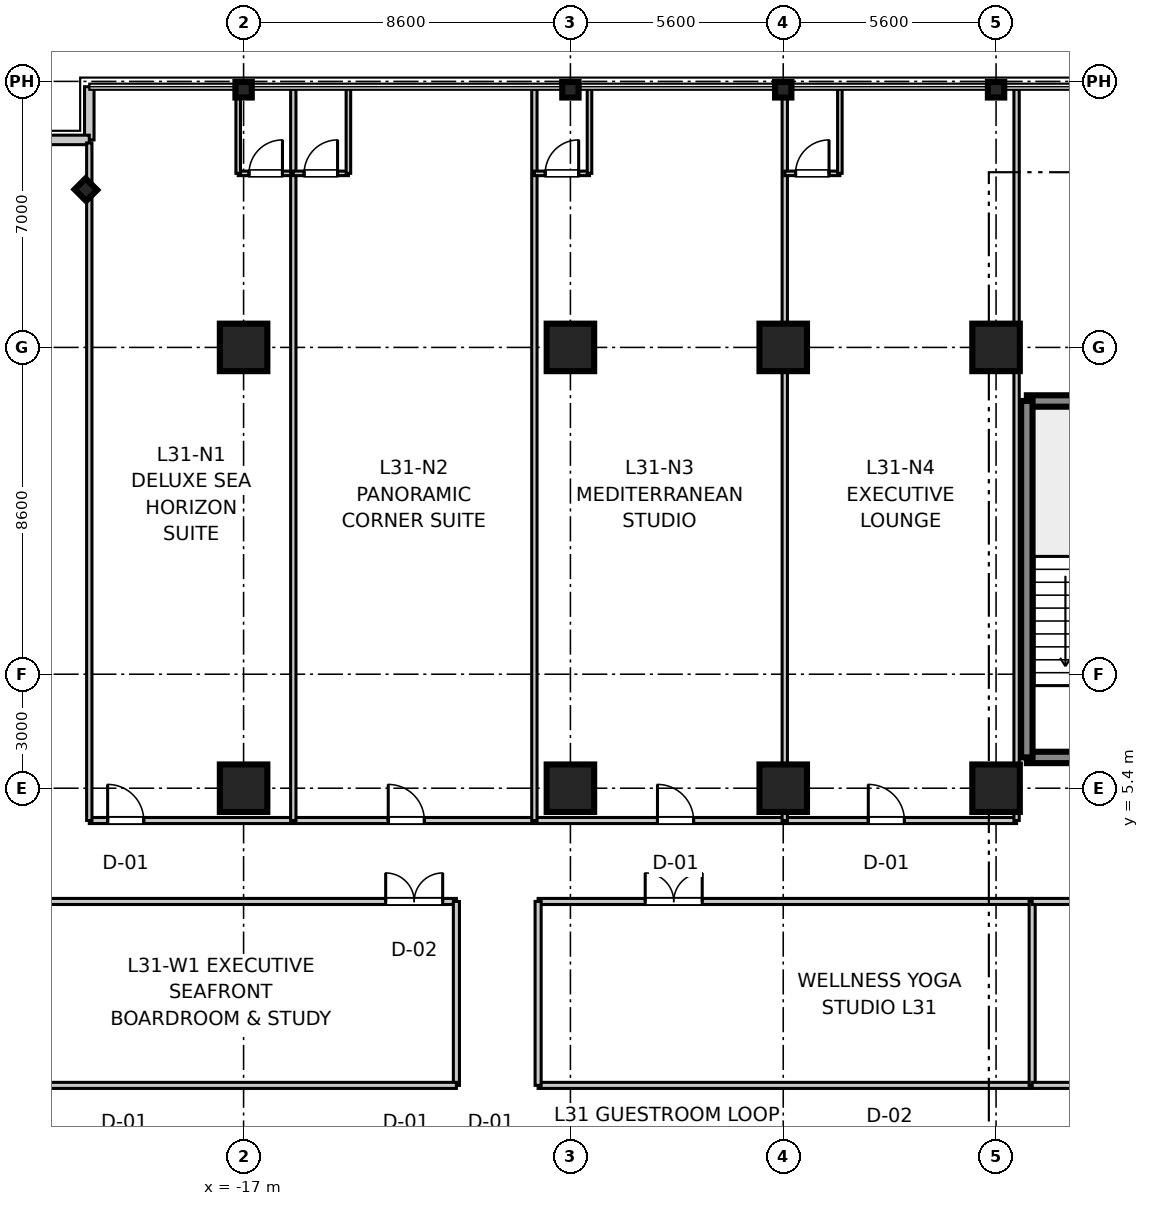
"""IFC4 building model, lengths in metres.
Left out: names, types, materials, properties, quantities, classifications, styles, units other than length and angle.
Written with IfcOpenShell. Run it as: python <this file> out.ifc"""

import sys

from ifc_helpers import new_model, si_unit, direction, frame, frame_2d, origin, origin_2d, place, context, subcontext, project, spatial, rectangle, i_section, extrude, source, transform, mapped, element, fill, save


model = new_model("IFC4")
c1 = context("Model", 3, precision=1e-05, world=origin(), true_north=direction((0.0, 1.0)))
c2 = subcontext(c1, "Body", "Model", "MODEL_VIEW")
j1 = project(units=[si_unit("LENGTHUNIT", "METRE"), si_unit("PLANEANGLEUNIT", "RADIAN")], contexts=[c1])
p1 = place(None, origin())
s1 = spatial("IfcSite", under=j1, at=p1, CompositionType="ELEMENT")
p2 = place(p1, origin())
s2 = spatial("IfcBuilding", under=s1, at=p2, CompositionType="ELEMENT")
p3 = place(p2, frame((0.0, 0.0, 124.8)))
s3 = spatial("IfcBuildingStorey", under=s2, at=p3, CompositionType="ELEMENT", Elevation=124.8)
m1 = source(origin(), c2, "Body", "SweptSolid", [
    extrude(rectangle(XDim=1.25, YDim=1.25, at=origin_2d()), origin(), (0.0, 0.0, 1.0), 3.605),
])
for number, where, z_axis, x_axis in (
    (1, (-17.0, 5.4, 0.0), (0.0, 0.0, 1.0), (1.0, 0.0, 0.0)),
    (2, (-17.0, 17.0, 0.0), (0.0, 0.0, 1.0), (1.0, 0.0, 0.0)),
    (3, (-8.4, 5.4, 0.0), (0.0, 0.0, 1.0), (1.0, 0.0, 0.0)),
    (4, (-8.4, 17.0, 0.0), (0.0, 0.0, 1.0), (1.0, 0.0, 0.0)),
    (5, (-2.8, 5.4, 0.0), (0.0, 0.0, 1.0), (1.0, 0.0, 0.0)),
    (6, (-2.8, 17.0, 0.0), (0.0, 0.0, 1.0), (1.0, 0.0, 0.0)),
    (7, (2.8, 5.4, 0.0), (0.0, 0.0, 1.0), (1.0, 0.0, 0.0)),
    (8, (2.8, 17.0, 0.0), (0.0, 0.0, 1.0), (1.0, 0.0, 0.0)),
):
    element("IfcColumn", number, at=place(p3, frame(where, z_axis=z_axis, x_axis=x_axis)), inside=s3, PredefinedType="COLUMN", context=c2, shape_type="MappedRepresentation", body=[
        mapped(m1, transform((0.0, 0.0, 0.0), scale=1.0)),
    ])
m2 = source(origin(), c2, "Body", "SweptSolid", [
    extrude(i_section(OverallWidth=0.409, OverallDepth=0.43, WebThickness=0.021, FlangeThickness=0.034, at=origin_2d()), origin(), (0.0, 0.0, 1.0), 3.605),
])
for number, where, z_axis, x_axis in (
    (9, (-17.0, 23.78, 0.0), (0.0, 0.0, 1.0), (0.0, 1.0, 0.0)),
    (10, (-8.4, 23.78, 0.0), (0.0, 0.0, 1.0), (0.0, 1.0, 0.0)),
    (11, (-2.8, 23.78, 0.0), (0.0, 0.0, 1.0), (0.0, 1.0, 0.0)),
    (12, (2.8, 23.78, 0.0), (0.0, 0.0, 1.0), (0.0, 1.0, 0.0)),
    (13, (-21.15, 21.15, 0.0), (0.0, 0.0, 1.0), (0.707, 0.707, 0.0)),
):
    element("IfcColumn", number, at=place(p3, frame(where, z_axis=z_axis, x_axis=x_axis)), inside=s3, PredefinedType="COLUMN", context=c2, shape_type="MappedRepresentation", body=[
        mapped(m2, transform((0.0, 0.0, 0.0), scale=1.0)),
    ])
m3 = source(origin(), c2, "Body", "SweptSolid", [
    extrude(rectangle(XDim=3.98, YDim=0.3, at=frame_2d((1.99, 0.0))), origin(), (0.0, 0.0, 1.0), 3.38),
])
for number, where, z_axis, x_axis in (
    (14, (3.61, 6.21, 0.0), (0.0, 0.0, 1.0), (1.0, 0.0, 0.0)),
    (15, (3.61, 15.59, 0.0), (0.0, 0.0, 1.0), (1.0, 0.0, 0.0)),
):
    element("IfcWall", number, at=place(p3, frame(where, z_axis=z_axis, x_axis=x_axis)), inside=s3, PredefinedType="SHEAR", context=c2, shape_type="MappedRepresentation", body=[
        mapped(m3, transform((0.0, 0.0, 0.0), scale=1.0)),
    ])
m4 = source(origin(), c2, "Body", "SweptSolid", [
    extrude(rectangle(XDim=9.38, YDim=0.3, at=frame_2d((4.69, 0.0))), origin(), (0.0, 0.0, 1.0), 3.38),
])
p4 = place(p3, frame((3.61, 6.21, 0.0), z_axis=(0.0, 0.0, 1.0), x_axis=(0.0, 1.0, 0.0)))
e16 = element("IfcWall", 16, at=p4, inside=s3, PredefinedType="SHEAR", context=c2, shape_type="MappedRepresentation", body=[
    mapped(m4, transform((0.0, 0.0, 0.0), scale=1.0)),
])
m5 = source(origin(), c2, "Body", "SweptSolid", [
    extrude(rectangle(XDim=1.4, YDim=0.25, at=frame_2d((0.7, 0.0))), origin(), (0.0, 0.0, 1.0), 3.38),
])
p5 = place(p3, frame((-21.06, 22.46, 0.0), z_axis=(0.0, 0.0, 1.0), x_axis=(0.0, 1.0, 0.0)))
e17 = element("IfcWall", 17, at=p5, inside=s3, PredefinedType="STANDARD", context=c2, shape_type="MappedRepresentation", body=[
    mapped(m5, transform((0.0, 0.0, 0.0), scale=1.0)),
])
m6 = source(origin(), c2, "Body", "SweptSolid", [
    extrude(rectangle(XDim=1.4, YDim=0.25, at=frame_2d((0.7, 0.0))), origin(), (0.0, 0.0, 1.0), 3.38),
])
p6 = place(p3, frame((-22.46, 22.46, 0.0), z_axis=(0.0, 0.0, 1.0), x_axis=(1.0, 0.0, 0.0)))
e18 = element("IfcWall", 18, at=p6, inside=s3, PredefinedType="STANDARD", context=c2, shape_type="MappedRepresentation", body=[
    mapped(m6, transform((0.0, 0.0, 0.0), scale=1.0)),
])
m7 = source(origin(), c2, "Body", "SweptSolid", [
    extrude(rectangle(XDim=24.4, YDim=0.16, at=frame_2d((12.2, 0.0))), origin(), (0.0, 0.0, 1.0), 2.72),
])
p7 = place(p3, frame((-21.06, 4.55, 0.0), z_axis=(0.0, 0.0, 1.0), x_axis=(1.0, 0.0, 0.0)))
e19 = element("IfcWall", 19, at=p7, inside=s3, PredefinedType="PARTITIONING", context=c2, shape_type="MappedRepresentation", body=[
    mapped(m7, transform((0.0, 0.0, 0.0), scale=1.0)),
])
p8 = place(p7, frame((0.483, 0.0, 0.0)))
e20 = element("IfcOpeningElement", 20, at=p8, cuts=e19, PredefinedType="OPENING", context=c2, shape_type="SweptSolid", body=[
    extrude(rectangle(XDim=0.95, YDim=2.1, at=frame_2d((0.475, 1.05))), frame((0.0, 0.09, 0.0), z_axis=(0.0, -1.0, 0.0), x_axis=(1.0, 0.0, 0.0)), (0.0, 0.0, 1.0), 0.18),
])
p9 = place(p7, frame((7.866, 0.0, 0.0)))
e21 = element("IfcOpeningElement", 21, at=p9, cuts=e19, PredefinedType="OPENING", context=c2, shape_type="SweptSolid", body=[
    extrude(rectangle(XDim=0.95, YDim=2.1, at=frame_2d((0.475, 1.05))), frame((0.0, 0.09, 0.0), z_axis=(0.0, -1.0, 0.0), x_axis=(1.0, 0.0, 0.0)), (0.0, 0.0, 1.0), 0.18),
])
p10 = place(p7, frame((14.951, 0.0, 0.0)))
e22 = element("IfcOpeningElement", 22, at=p10, cuts=e19, PredefinedType="OPENING", context=c2, shape_type="SweptSolid", body=[
    extrude(rectangle(XDim=0.95, YDim=2.1, at=frame_2d((0.475, 1.05))), frame((0.0, 0.09, 0.0), z_axis=(0.0, -1.0, 0.0), x_axis=(1.0, 0.0, 0.0)), (0.0, 0.0, 1.0), 0.18),
])
p11 = place(p7, frame((20.498, 0.0, 0.0)))
e23 = element("IfcOpeningElement", 23, at=p11, cuts=e19, PredefinedType="OPENING", context=c2, shape_type="SweptSolid", body=[
    extrude(rectangle(XDim=0.95, YDim=2.1, at=frame_2d((0.475, 1.05))), frame((0.0, 0.09, 0.0), z_axis=(0.0, -1.0, 0.0), x_axis=(1.0, 0.0, 0.0)), (0.0, 0.0, 1.0), 0.18),
])
m8 = source(origin(), c2, "Body", "SweptSolid", [
    extrude(rectangle(XDim=17.83, YDim=0.14, at=frame_2d((8.915, 0.0))), origin(), (0.0, 0.0, 1.0), 2.72),
])
p12 = place(p3, frame((-21.06, 4.55, 0.0), z_axis=(0.0, 0.0, 1.0), x_axis=(0.0, 1.0, 0.0)))
e24 = element("IfcWall", 24, at=p12, inside=s3, PredefinedType="PARTITIONING", context=c2, shape_type="MappedRepresentation", body=[
    mapped(m8, transform((0.0, 0.0, 0.0), scale=1.0)),
])
m9 = source(origin(), c2, "Body", "SweptSolid", [
    extrude(rectangle(XDim=19.25, YDim=0.14, at=frame_2d((9.625, 0.0))), origin(), (0.0, 0.0, 1.0), 2.72),
])
p13 = place(p3, frame((3.34, 4.55, 0.0), z_axis=(0.0, 0.0, 1.0), x_axis=(0.0, 1.0, 0.0)))
e25 = element("IfcWall", 25, at=p13, inside=s3, PredefinedType="PARTITIONING", context=c2, shape_type="MappedRepresentation", body=[
    mapped(m9, transform((0.0, 0.0, 0.0), scale=1.0)),
])
m10 = source(origin(), c2, "Body", "SweptSolid", [
    extrude(rectangle(XDim=1.45, YDim=0.12, at=frame_2d((0.725, 0.0))), origin(), (0.0, 0.0, 1.0), 2.72),
])
p14 = place(p3, frame((-17.142, 21.58, 0.0), z_axis=(0.0, 0.0, 1.0), x_axis=(1.0, 0.0, 0.0)))
e26 = element("IfcWall", 26, at=p14, inside=s3, PredefinedType="PARTITIONING", context=c2, shape_type="MappedRepresentation", body=[
    mapped(m10, transform((0.0, 0.0, 0.0), scale=1.0)),
])
p15 = place(p14, frame((0.285, 0.0, 0.0)))
e27 = element("IfcOpeningElement", 27, at=p15, cuts=e26, PredefinedType="OPENING", context=c2, shape_type="SweptSolid", body=[
    extrude(rectangle(XDim=0.88, YDim=2.1, at=frame_2d((0.44, 1.05))), frame((0.0, 0.07, 0.0), z_axis=(0.0, -1.0, 0.0), x_axis=(1.0, 0.0, 0.0)), (0.0, 0.0, 1.0), 0.14),
])
m11 = source(origin(), c2, "Body", "SweptSolid", [
    extrude(rectangle(XDim=2.22, YDim=0.12, at=frame_2d((1.11, 0.0))), origin(), (0.0, 0.0, 1.0), 2.72),
])
p16 = place(p3, frame((-17.142, 21.58, 0.0), z_axis=(0.0, 0.0, 1.0), x_axis=(0.0, 1.0, 0.0)))
e28 = element("IfcWall", 28, at=p16, inside=s3, PredefinedType="PARTITIONING", context=c2, shape_type="MappedRepresentation", body=[
    mapped(m11, transform((0.0, 0.0, 0.0), scale=1.0)),
])
p17 = place(p3, frame((-15.692, 4.55, 0.0), z_axis=(0.0, 0.0, 1.0), x_axis=(0.0, 1.0, 0.0)))
e29 = element("IfcWall", 29, at=p17, inside=s3, PredefinedType="PARTITIONING", context=c2, shape_type="MappedRepresentation", body=[
    mapped(m9, transform((0.0, 0.0, 0.0), scale=1.0)),
])
m12 = source(origin(), c2, "Body", "SweptSolid", [
    extrude(rectangle(XDim=1.45, YDim=0.12, at=frame_2d((0.725, 0.0))), origin(), (0.0, 0.0, 1.0), 2.72),
])
p18 = place(p3, frame((-15.692, 21.58, 0.0), z_axis=(0.0, 0.0, 1.0), x_axis=(1.0, 0.0, 0.0)))
e30 = element("IfcWall", 30, at=p18, inside=s3, PredefinedType="PARTITIONING", context=c2, shape_type="MappedRepresentation", body=[
    mapped(m12, transform((0.0, 0.0, 0.0), scale=1.0)),
])
p19 = place(p18, frame((0.285, 0.0, 0.0)))
e31 = element("IfcOpeningElement", 31, at=p19, cuts=e30, PredefinedType="OPENING", context=c2, shape_type="SweptSolid", body=[
    extrude(rectangle(XDim=0.88, YDim=2.1, at=frame_2d((0.44, 1.05))), frame((0.0, 0.07, 0.0), z_axis=(0.0, -1.0, 0.0), x_axis=(1.0, 0.0, 0.0)), (0.0, 0.0, 1.0), 0.14),
])
p20 = place(p3, frame((-14.242, 21.58, 0.0), z_axis=(0.0, 0.0, 1.0), x_axis=(0.0, 1.0, 0.0)))
e32 = element("IfcWall", 32, at=p20, inside=s3, PredefinedType="PARTITIONING", context=c2, shape_type="MappedRepresentation", body=[
    mapped(m11, transform((0.0, 0.0, 0.0), scale=1.0)),
])
p21 = place(p3, frame((-9.348, 4.55, 0.0), z_axis=(0.0, 0.0, 1.0), x_axis=(0.0, 1.0, 0.0)))
e33 = element("IfcWall", 33, at=p21, inside=s3, PredefinedType="PARTITIONING", context=c2, shape_type="MappedRepresentation", body=[
    mapped(m9, transform((0.0, 0.0, 0.0), scale=1.0)),
])
p22 = place(p3, frame((-9.348, 21.58, 0.0), z_axis=(0.0, 0.0, 1.0), x_axis=(1.0, 0.0, 0.0)))
e34 = element("IfcWall", 34, at=p22, inside=s3, PredefinedType="PARTITIONING", context=c2, shape_type="MappedRepresentation", body=[
    mapped(m12, transform((0.0, 0.0, 0.0), scale=1.0)),
])
p23 = place(p22, frame((0.285, 0.0, 0.0)))
e35 = element("IfcOpeningElement", 35, at=p23, cuts=e34, PredefinedType="OPENING", context=c2, shape_type="SweptSolid", body=[
    extrude(rectangle(XDim=0.88, YDim=2.1, at=frame_2d((0.44, 1.05))), frame((0.0, 0.07, 0.0), z_axis=(0.0, -1.0, 0.0), x_axis=(1.0, 0.0, 0.0)), (0.0, 0.0, 1.0), 0.14),
])
p24 = place(p3, frame((-7.898, 21.58, 0.0), z_axis=(0.0, 0.0, 1.0), x_axis=(0.0, 1.0, 0.0)))
e36 = element("IfcWall", 36, at=p24, inside=s3, PredefinedType="PARTITIONING", context=c2, shape_type="MappedRepresentation", body=[
    mapped(m11, transform((0.0, 0.0, 0.0), scale=1.0)),
])
p25 = place(p3, frame((-2.76, 4.55, 0.0), z_axis=(0.0, 0.0, 1.0), x_axis=(0.0, 1.0, 0.0)))
e37 = element("IfcWall", 37, at=p25, inside=s3, PredefinedType="PARTITIONING", context=c2, shape_type="MappedRepresentation", body=[
    mapped(m9, transform((0.0, 0.0, 0.0), scale=1.0)),
])
p26 = place(p3, frame((-2.76, 21.58, 0.0), z_axis=(0.0, 0.0, 1.0), x_axis=(1.0, 0.0, 0.0)))
e38 = element("IfcWall", 38, at=p26, inside=s3, PredefinedType="PARTITIONING", context=c2, shape_type="MappedRepresentation", body=[
    mapped(m12, transform((0.0, 0.0, 0.0), scale=1.0)),
])
p27 = place(p26, frame((0.285, 0.0, 0.0)))
e39 = element("IfcOpeningElement", 39, at=p27, cuts=e38, PredefinedType="OPENING", context=c2, shape_type="SweptSolid", body=[
    extrude(rectangle(XDim=0.88, YDim=2.1, at=frame_2d((0.44, 1.05))), frame((0.0, 0.07, 0.0), z_axis=(0.0, -1.0, 0.0), x_axis=(1.0, 0.0, 0.0)), (0.0, 0.0, 1.0), 0.14),
])
p28 = place(p3, frame((-1.31, 21.58, 0.0), z_axis=(0.0, 0.0, 1.0), x_axis=(0.0, 1.0, 0.0)))
e40 = element("IfcWall", 40, at=p28, inside=s3, PredefinedType="PARTITIONING", context=c2, shape_type="MappedRepresentation", body=[
    mapped(m11, transform((0.0, 0.0, 0.0), scale=1.0)),
])
m13 = source(origin(), c2, "Body", "SweptSolid", [
    extrude(rectangle(XDim=12.4, YDim=0.16, at=frame_2d((6.2, 0.0))), origin(), (0.0, 0.0, 1.0), 2.72),
])
p29 = place(p3, frame((-23.8, 2.42, 0.0), z_axis=(0.0, 0.0, 1.0), x_axis=(1.0, 0.0, 0.0)))
e41 = element("IfcWall", 41, at=p29, inside=s3, PredefinedType="PARTITIONING", context=c2, shape_type="MappedRepresentation", body=[
    mapped(m13, transform((0.0, 0.0, 0.0), scale=1.0)),
])
p30 = place(p29, frame((10.539, 0.0, 0.0)))
e42 = element("IfcOpeningElement", 42, at=p30, cuts=e41, PredefinedType="OPENING", context=c2, shape_type="SweptSolid", body=[
    extrude(rectangle(XDim=1.5, YDim=2.15, at=frame_2d((0.75, 1.075))), frame((0.0, 0.09, 0.0), z_axis=(0.0, -1.0, 0.0), x_axis=(1.0, 0.0, 0.0)), (0.0, 0.0, 1.0), 0.18),
])
m14 = source(origin(), c2, "Body", "SweptSolid", [
    extrude(rectangle(XDim=4.84, YDim=0.16, at=frame_2d((2.42, 0.0))), origin(), (0.0, 0.0, 1.0), 2.72),
])
p31 = place(p3, frame((-11.4, -2.42, 0.0), z_axis=(0.0, 0.0, 1.0), x_axis=(0.0, 1.0, 0.0)))
e43 = element("IfcWall", 43, at=p31, inside=s3, PredefinedType="PARTITIONING", context=c2, shape_type="MappedRepresentation", body=[
    mapped(m14, transform((0.0, 0.0, 0.0), scale=1.0)),
])
p32 = place(p3, frame((-23.8, -2.42, 0.0), z_axis=(0.0, 0.0, 1.0), x_axis=(1.0, 0.0, 0.0)))
e44 = element("IfcWall", 44, at=p32, inside=s3, PredefinedType="PARTITIONING", context=c2, shape_type="MappedRepresentation", body=[
    mapped(m13, transform((0.0, 0.0, 0.0), scale=1.0)),
])
m15 = source(origin(), c2, "Body", "SweptSolid", [
    extrude(rectangle(XDim=13.0, YDim=0.16, at=frame_2d((6.5, 0.0))), origin(), (0.0, 0.0, 1.0), 2.72),
])
p33 = place(p3, frame((-9.25, -2.42, 0.0), z_axis=(0.0, 0.0, 1.0), x_axis=(1.0, 0.0, 0.0)))
e45 = element("IfcWall", 45, at=p33, inside=s3, PredefinedType="PARTITIONING", context=c2, shape_type="MappedRepresentation", body=[
    mapped(m15, transform((0.0, 0.0, 0.0), scale=1.0)),
])
p34 = place(p3, frame((-9.25, 2.42, 0.0), z_axis=(0.0, 0.0, 1.0), x_axis=(1.0, 0.0, 0.0)))
e46 = element("IfcWall", 46, at=p34, inside=s3, PredefinedType="PARTITIONING", context=c2, shape_type="MappedRepresentation", body=[
    mapped(m15, transform((0.0, 0.0, 0.0), scale=1.0)),
])
p35 = place(p34, frame((2.818, 0.0, 0.0)))
e47 = element("IfcOpeningElement", 47, at=p35, cuts=e46, PredefinedType="OPENING", context=c2, shape_type="SweptSolid", body=[
    extrude(rectangle(XDim=1.5, YDim=2.15, at=frame_2d((0.75, 1.075))), frame((0.0, 0.09, 0.0), z_axis=(0.0, -1.0, 0.0), x_axis=(1.0, 0.0, 0.0)), (0.0, 0.0, 1.0), 0.18),
])
for number, where, z_axis, x_axis in (
    (48, (-9.25, -2.42, 0.0), (0.0, 0.0, 1.0), (0.0, 1.0, 0.0)),
    (49, (3.75, -2.42, 0.0), (0.0, 0.0, 1.0), (0.0, 1.0, 0.0)),
):
    element("IfcWall", number, at=place(p3, frame(where, z_axis=z_axis, x_axis=x_axis)), inside=s3, PredefinedType="PARTITIONING", context=c2, shape_type="MappedRepresentation", body=[
        mapped(m14, transform((0.0, 0.0, 0.0), scale=1.0)),
    ])
m16 = source(origin(), c2, "Body", "SweptSolid", [
    extrude(rectangle(XDim=3.6, YDim=0.16, at=frame_2d((1.8, 0.0))), origin(), (0.0, 0.0, 1.0), 2.72),
])
p36 = place(p3, frame((3.75, -2.42, 0.0), z_axis=(0.0, 0.0, 1.0), x_axis=(1.0, 0.0, 0.0)))
e50 = element("IfcWall", 50, at=p36, inside=s3, PredefinedType="PARTITIONING", context=c2, shape_type="MappedRepresentation", body=[
    mapped(m16, transform((0.0, 0.0, 0.0), scale=1.0)),
])
p37 = place(p36, frame((1.38, 0.0, 0.0)))
e51 = element("IfcOpeningElement", 51, at=p37, cuts=e50, PredefinedType="OPENING", context=c2, shape_type="SweptSolid", body=[
    extrude(rectangle(XDim=1.0, YDim=2.1, at=frame_2d((0.5, 1.05))), frame((0.0, 0.09, 0.0), z_axis=(0.0, -1.0, 0.0), x_axis=(1.0, 0.0, 0.0)), (0.0, 0.0, 1.0), 0.18),
])
p38 = place(p3, frame((3.75, 2.42, 0.0), z_axis=(0.0, 0.0, 1.0), x_axis=(1.0, 0.0, 0.0)))
e52 = element("IfcWall", 52, at=p38, inside=s3, PredefinedType="PARTITIONING", context=c2, shape_type="MappedRepresentation", body=[
    mapped(m16, transform((0.0, 0.0, 0.0), scale=1.0)),
])
m17 = source(origin(), c2, "Body", "SweptSolid", [
    extrude(rectangle(XDim=0.88, YDim=2.1, at=frame_2d((0.44, 1.05))), frame((0.0, 0.025, 0.0), z_axis=(0.0, -1.0, 0.0), x_axis=(1.0, 0.0, 0.0)), (0.0, 0.0, 1.0), 0.05),
])
p39 = place(p15, origin())
e53 = element("IfcDoor", 53, at=p39, inside=s3, OperationType="SINGLE_SWING_RIGHT", PredefinedType="DOOR", context=c2, shape_type="MappedRepresentation", body=[
    mapped(m17, transform((0.0, 0.0, 0.0), scale=1.0)),
])
fill(e27, e53)
m18 = source(origin(), c2, "Body", "SweptSolid", [
    extrude(rectangle(XDim=0.95, YDim=2.1, at=frame_2d((0.475, 1.05))), frame((0.0, 0.025, 0.0), z_axis=(0.0, -1.0, 0.0), x_axis=(1.0, 0.0, 0.0)), (0.0, 0.0, 1.0), 0.05),
])
p40 = place(p8, origin())
e54 = element("IfcDoor", 54, at=p40, inside=s3, OperationType="SINGLE_SWING_LEFT", PredefinedType="DOOR", context=c2, shape_type="MappedRepresentation", body=[
    mapped(m18, transform((0.0, 0.0, 0.0), scale=1.0)),
])
fill(e20, e54)
p41 = place(p19, origin())
e55 = element("IfcDoor", 55, at=p41, inside=s3, OperationType="SINGLE_SWING_RIGHT", PredefinedType="DOOR", context=c2, shape_type="MappedRepresentation", body=[
    mapped(m17, transform((0.0, 0.0, 0.0), scale=1.0)),
])
fill(e31, e55)
p42 = place(p9, origin())
e56 = element("IfcDoor", 56, at=p42, inside=s3, OperationType="SINGLE_SWING_LEFT", PredefinedType="DOOR", context=c2, shape_type="MappedRepresentation", body=[
    mapped(m18, transform((0.0, 0.0, 0.0), scale=1.0)),
])
fill(e21, e56)
p43 = place(p23, origin())
e57 = element("IfcDoor", 57, at=p43, inside=s3, OperationType="SINGLE_SWING_RIGHT", PredefinedType="DOOR", context=c2, shape_type="MappedRepresentation", body=[
    mapped(m17, transform((0.0, 0.0, 0.0), scale=1.0)),
])
fill(e35, e57)
p44 = place(p10, origin())
e58 = element("IfcDoor", 58, at=p44, inside=s3, OperationType="SINGLE_SWING_LEFT", PredefinedType="DOOR", context=c2, shape_type="MappedRepresentation", body=[
    mapped(m18, transform((0.0, 0.0, 0.0), scale=1.0)),
])
fill(e22, e58)
p45 = place(p27, origin())
e59 = element("IfcDoor", 59, at=p45, inside=s3, OperationType="SINGLE_SWING_RIGHT", PredefinedType="DOOR", context=c2, shape_type="MappedRepresentation", body=[
    mapped(m17, transform((0.0, 0.0, 0.0), scale=1.0)),
])
fill(e39, e59)
p46 = place(p11, origin())
e60 = element("IfcDoor", 60, at=p46, inside=s3, OperationType="SINGLE_SWING_LEFT", PredefinedType="DOOR", context=c2, shape_type="MappedRepresentation", body=[
    mapped(m18, transform((0.0, 0.0, 0.0), scale=1.0)),
])
fill(e23, e60)
m19 = source(origin(), c2, "Body", "SweptSolid", [
    extrude(rectangle(XDim=1.5, YDim=2.15, at=frame_2d((0.75, 1.075))), frame((0.0, 0.025, 0.0), z_axis=(0.0, -1.0, 0.0), x_axis=(1.0, 0.0, 0.0)), (0.0, 0.0, 1.0), 0.05),
])
p47 = place(p30, origin())
e61 = element("IfcDoor", 61, at=p47, inside=s3, OperationType="DOUBLE_DOOR_SINGLE_SWING", PredefinedType="DOOR", context=c2, shape_type="MappedRepresentation", body=[
    mapped(m19, transform((0.0, 0.0, 0.0), scale=1.0)),
])
fill(e42, e61)
p48 = place(p35, frame((1.5, 0.0, 0.0), z_axis=(0.0, 0.0, 1.0), x_axis=(-1.0, 0.0, 0.0)))
e62 = element("IfcDoor", 62, at=p48, inside=s3, OperationType="DOUBLE_DOOR_SINGLE_SWING", PredefinedType="DOOR", context=c2, shape_type="MappedRepresentation", body=[
    mapped(m19, transform((0.0, 0.0, 0.0), scale=1.0)),
])
fill(e47, e62)
save(model, sys.argv[1])
